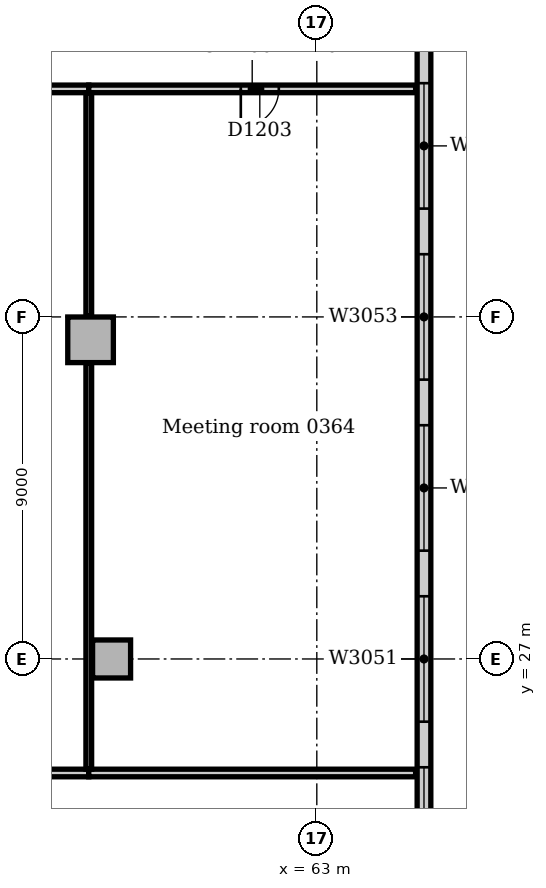
"""IFC4 building model, lengths in metres.
Left out: names, types, materials, properties, quantities, classifications, styles, units other than length and angle.
Written with IfcOpenShell. Run it as: python <this file> out.ifc"""

import sys

from ifc_helpers import new_model, si_unit, direction, frame, frame_2d, origin, origin_2d, place, context, subcontext, project, spatial, rectangle, extrude, element, fill, save


model = new_model("IFC4")
c1 = context("Model", 3, precision=1e-05, world=origin(), true_north=direction((0.0, 1.0)))
c2 = subcontext(c1, "Body", "Model", "MODEL_VIEW")
j1 = project(units=[si_unit("LENGTHUNIT", "METRE"), si_unit("PLANEANGLEUNIT", "RADIAN")], contexts=[c1])
p1 = place(None, origin())
s1 = spatial("IfcSite", under=j1, at=p1, CompositionType="ELEMENT")
p2 = place(p1, origin())
s2 = spatial("IfcBuilding", under=s1, at=p2, CompositionType="ELEMENT")
p3 = place(p2, frame((0.0, 0.0, 16.0)))
s3 = spatial("IfcBuildingStorey", under=s2, at=p3, CompositionType="ELEMENT", Elevation=16.0)
p4 = place(p3, frame((57.047, 35.398, 0.0), z_axis=(0.0, 0.0, 1.0), x_axis=(1.0, 0.0, 0.0)))
e1 = element("IfcColumn", 1, at=p4, inside=s3, PredefinedType="COLUMN", context=c2, shape_type="SweptSolid", body=[
    extrude(rectangle(XDim=1.2, YDim=1.2, at=origin_2d()), origin(), (0.0, 0.0, 1.0), 4.7),
])
p5 = place(p3, frame((57.6, 27.0, 0.0), z_axis=(0.0, 0.0, 1.0), x_axis=(1.0, 0.0, 0.0)))
e2 = element("IfcColumn", 2, at=p5, inside=s3, PredefinedType="COLUMN", context=c2, shape_type="SweptSolid", body=[
    extrude(rectangle(XDim=1.0, YDim=1.0, at=origin_2d()), origin(), (0.0, 0.0, 1.0), 4.7),
])
p6 = place(p3, frame((65.82, -9.0, 0.0), z_axis=(0.0, 0.0, 1.0), x_axis=(0.0, 1.0, 0.0)))
e3 = element("IfcWall", 3, at=p6, inside=s3, PredefinedType="STANDARD", context=c2, shape_type="SweptSolid", body=[
    extrude(rectangle(XDim=63.0, YDim=0.36, at=frame_2d((31.5, 0.0))), origin(), (0.0, 0.0, 1.0), 4.7),
])
p7 = place(p6, frame((2.85, 0.0, 0.9)))
e4 = element("IfcOpeningElement", 4, at=p7, cuts=e3, PredefinedType="OPENING", context=c2, shape_type="SweptSolid", body=[
    extrude(rectangle(XDim=3.3, YDim=2.4, at=frame_2d((1.65, 1.2))), frame((0.0, 0.19, 0.0), z_axis=(0.0, -1.0, 0.0), x_axis=(1.0, 0.0, 0.0)), (0.0, 0.0, 1.0), 0.38),
])
p8 = place(p6, frame((7.35, 0.0, 0.9)))
e5 = element("IfcOpeningElement", 5, at=p8, cuts=e3, PredefinedType="OPENING", context=c2, shape_type="SweptSolid", body=[
    extrude(rectangle(XDim=3.3, YDim=2.4, at=frame_2d((1.65, 1.2))), frame((0.0, 0.19, 0.0), z_axis=(0.0, -1.0, 0.0), x_axis=(1.0, 0.0, 0.0)), (0.0, 0.0, 1.0), 0.38),
])
p9 = place(p6, frame((11.85, 0.0, 0.9)))
e6 = element("IfcOpeningElement", 6, at=p9, cuts=e3, PredefinedType="OPENING", context=c2, shape_type="SweptSolid", body=[
    extrude(rectangle(XDim=3.3, YDim=2.4, at=frame_2d((1.65, 1.2))), frame((0.0, 0.19, 0.0), z_axis=(0.0, -1.0, 0.0), x_axis=(1.0, 0.0, 0.0)), (0.0, 0.0, 1.0), 0.38),
])
p10 = place(p6, frame((16.35, 0.0, 0.9)))
e7 = element("IfcOpeningElement", 7, at=p10, cuts=e3, PredefinedType="OPENING", context=c2, shape_type="SweptSolid", body=[
    extrude(rectangle(XDim=3.3, YDim=2.4, at=frame_2d((1.65, 1.2))), frame((0.0, 0.19, 0.0), z_axis=(0.0, -1.0, 0.0), x_axis=(1.0, 0.0, 0.0)), (0.0, 0.0, 1.0), 0.38),
])
p11 = place(p6, frame((20.85, 0.0, 0.9)))
e8 = element("IfcOpeningElement", 8, at=p11, cuts=e3, PredefinedType="OPENING", context=c2, shape_type="SweptSolid", body=[
    extrude(rectangle(XDim=3.3, YDim=2.4, at=frame_2d((1.65, 1.2))), frame((0.0, 0.19, 0.0), z_axis=(0.0, -1.0, 0.0), x_axis=(1.0, 0.0, 0.0)), (0.0, 0.0, 1.0), 0.38),
])
p12 = place(p6, frame((25.35, 0.0, 0.9)))
e9 = element("IfcOpeningElement", 9, at=p12, cuts=e3, PredefinedType="OPENING", context=c2, shape_type="SweptSolid", body=[
    extrude(rectangle(XDim=3.3, YDim=2.4, at=frame_2d((1.65, 1.2))), frame((0.0, 0.19, 0.0), z_axis=(0.0, -1.0, 0.0), x_axis=(1.0, 0.0, 0.0)), (0.0, 0.0, 1.0), 0.38),
])
p13 = place(p6, frame((29.85, 0.0, 0.9)))
e10 = element("IfcOpeningElement", 10, at=p13, cuts=e3, PredefinedType="OPENING", context=c2, shape_type="SweptSolid", body=[
    extrude(rectangle(XDim=3.3, YDim=2.4, at=frame_2d((1.65, 1.2))), frame((0.0, 0.19, 0.0), z_axis=(0.0, -1.0, 0.0), x_axis=(1.0, 0.0, 0.0)), (0.0, 0.0, 1.0), 0.38),
])
p14 = place(p6, frame((34.35, 0.0, 0.9)))
e11 = element("IfcOpeningElement", 11, at=p14, cuts=e3, PredefinedType="OPENING", context=c2, shape_type="SweptSolid", body=[
    extrude(rectangle(XDim=3.3, YDim=2.4, at=frame_2d((1.65, 1.2))), frame((0.0, 0.19, 0.0), z_axis=(0.0, -1.0, 0.0), x_axis=(1.0, 0.0, 0.0)), (0.0, 0.0, 1.0), 0.38),
])
p15 = place(p6, frame((38.85, 0.0, 0.9)))
e12 = element("IfcOpeningElement", 12, at=p15, cuts=e3, PredefinedType="OPENING", context=c2, shape_type="SweptSolid", body=[
    extrude(rectangle(XDim=3.3, YDim=2.4, at=frame_2d((1.65, 1.2))), frame((0.0, 0.19, 0.0), z_axis=(0.0, -1.0, 0.0), x_axis=(1.0, 0.0, 0.0)), (0.0, 0.0, 1.0), 0.38),
])
p16 = place(p6, frame((43.35, 0.0, 0.9)))
e13 = element("IfcOpeningElement", 13, at=p16, cuts=e3, PredefinedType="OPENING", context=c2, shape_type="SweptSolid", body=[
    extrude(rectangle(XDim=3.3, YDim=2.4, at=frame_2d((1.65, 1.2))), frame((0.0, 0.19, 0.0), z_axis=(0.0, -1.0, 0.0), x_axis=(1.0, 0.0, 0.0)), (0.0, 0.0, 1.0), 0.38),
])
p17 = place(p6, frame((47.85, 0.0, 0.9)))
e14 = element("IfcOpeningElement", 14, at=p17, cuts=e3, PredefinedType="OPENING", context=c2, shape_type="SweptSolid", body=[
    extrude(rectangle(XDim=3.3, YDim=2.4, at=frame_2d((1.65, 1.2))), frame((0.0, 0.19, 0.0), z_axis=(0.0, -1.0, 0.0), x_axis=(1.0, 0.0, 0.0)), (0.0, 0.0, 1.0), 0.38),
])
p18 = place(p6, frame((52.35, 0.0, 0.9)))
e15 = element("IfcOpeningElement", 15, at=p18, cuts=e3, PredefinedType="OPENING", context=c2, shape_type="SweptSolid", body=[
    extrude(rectangle(XDim=3.3, YDim=2.4, at=frame_2d((1.65, 1.2))), frame((0.0, 0.19, 0.0), z_axis=(0.0, -1.0, 0.0), x_axis=(1.0, 0.0, 0.0)), (0.0, 0.0, 1.0), 0.38),
])
p19 = place(p6, frame((56.85, 0.0, 0.9)))
e16 = element("IfcOpeningElement", 16, at=p19, cuts=e3, PredefinedType="OPENING", context=c2, shape_type="SweptSolid", body=[
    extrude(rectangle(XDim=3.3, YDim=2.4, at=frame_2d((1.65, 1.2))), frame((0.0, 0.19, 0.0), z_axis=(0.0, -1.0, 0.0), x_axis=(1.0, 0.0, 0.0)), (0.0, 0.0, 1.0), 0.38),
])
p20 = place(p3, frame((48.0, 42.0, 0.0), z_axis=(0.0, 0.0, 1.0), x_axis=(1.0, 0.0, 0.0)))
e17 = element("IfcWall", 17, at=p20, inside=s3, PredefinedType="PARTITIONING", context=c2, shape_type="SweptSolid", body=[
    extrude(rectangle(XDim=9.0, YDim=0.2, at=frame_2d((4.5, 0.0))), origin(), (0.0, 0.0, 1.0), 4.7),
])
p21 = place(p20, frame((4.0, 0.0, 0.0)))
e18 = element("IfcOpeningElement", 18, at=p21, cuts=e17, PredefinedType="OPENING", context=c2, shape_type="SweptSolid", body=[
    extrude(rectangle(XDim=1.0, YDim=2.1, at=frame_2d((0.5, 1.05))), frame((0.0, 0.11, 0.0), z_axis=(0.0, -1.0, 0.0), x_axis=(1.0, 0.0, 0.0)), (0.0, 0.0, 1.0), 0.22),
])
p22 = place(p3, frame((57.0, 42.0, 0.0), z_axis=(0.0, 0.0, 1.0), x_axis=(1.0, 0.0, 0.0)))
e19 = element("IfcWall", 19, at=p22, inside=s3, PredefinedType="PARTITIONING", context=c2, shape_type="SweptSolid", body=[
    extrude(rectangle(XDim=8.6, YDim=0.2, at=frame_2d((4.3, 0.0))), origin(), (0.0, 0.0, 1.0), 4.7),
])
p23 = place(p22, frame((4.0, 0.0, 0.0)))
e20 = element("IfcOpeningElement", 20, at=p23, cuts=e19, PredefinedType="OPENING", context=c2, shape_type="SweptSolid", body=[
    extrude(rectangle(XDim=1.0, YDim=2.1, at=frame_2d((0.5, 1.05))), frame((0.0, 0.11, 0.0), z_axis=(0.0, -1.0, 0.0), x_axis=(1.0, 0.0, 0.0)), (0.0, 0.0, 1.0), 0.22),
])
p24 = place(p3, frame((48.0, 24.0, 0.0), z_axis=(0.0, 0.0, 1.0), x_axis=(1.0, 0.0, 0.0)))
e21 = element("IfcWall", 21, at=p24, inside=s3, PredefinedType="PARTITIONING", context=c2, shape_type="SweptSolid", body=[
    extrude(rectangle(XDim=9.0, YDim=0.2, at=frame_2d((4.5, 0.0))), origin(), (0.0, 0.0, 1.0), 4.7),
])
p25 = place(p3, frame((57.0, 24.0, 0.0), z_axis=(0.0, 0.0, 1.0), x_axis=(1.0, 0.0, 0.0)))
e22 = element("IfcWall", 22, at=p25, inside=s3, PredefinedType="PARTITIONING", context=c2, shape_type="SweptSolid", body=[
    extrude(rectangle(XDim=8.6, YDim=0.2, at=frame_2d((4.3, 0.0))), origin(), (0.0, 0.0, 1.0), 4.7),
])
p26 = place(p3, frame((57.0, 24.1, 0.0), z_axis=(0.0, 0.0, 1.0), x_axis=(0.0, 1.0, 0.0)))
e23 = element("IfcWall", 23, at=p26, inside=s3, PredefinedType="PARTITIONING", context=c2, shape_type="SweptSolid", body=[
    extrude(rectangle(XDim=10.678, YDim=0.15, at=frame_2d((5.339, 0.0))), origin(), (0.0, 0.0, 1.0), 4.7),
])
p27 = place(p3, frame((57.0, 36.018, 0.0), z_axis=(0.0, 0.0, 1.0), x_axis=(0.0, 1.0, 0.0)))
e24 = element("IfcWall", 24, at=p27, inside=s3, PredefinedType="PARTITIONING", context=c2, shape_type="SweptSolid", body=[
    extrude(rectangle(XDim=5.882, YDim=0.15, at=frame_2d((2.941, 0.0))), origin(), (0.0, 0.0, 1.0), 4.7),
])
p28 = place(p13, origin())
e25 = element("IfcWindow", 25, at=p28, inside=s3, PartitioningType="SINGLE_PANEL", PredefinedType="WINDOW", context=c2, shape_type="SweptSolid", body=[
    extrude(rectangle(XDim=3.3, YDim=2.4, at=frame_2d((1.65, 1.2))), frame((0.0, 0.13, 0.0), z_axis=(0.0, -1.0, 0.0), x_axis=(1.0, 0.0, 0.0)), (0.0, 0.0, 1.0), 0.06),
])
fill(e10, e25)
p29 = place(p14, origin())
e26 = element("IfcWindow", 26, at=p29, inside=s3, PartitioningType="SINGLE_PANEL", PredefinedType="WINDOW", context=c2, shape_type="SweptSolid", body=[
    extrude(rectangle(XDim=3.3, YDim=2.4, at=frame_2d((1.65, 1.2))), frame((0.0, 0.13, 0.0), z_axis=(0.0, -1.0, 0.0), x_axis=(1.0, 0.0, 0.0)), (0.0, 0.0, 1.0), 0.06),
])
fill(e11, e26)
p30 = place(p15, origin())
e27 = element("IfcWindow", 27, at=p30, inside=s3, PartitioningType="SINGLE_PANEL", PredefinedType="WINDOW", context=c2, shape_type="SweptSolid", body=[
    extrude(rectangle(XDim=3.3, YDim=2.4, at=frame_2d((1.65, 1.2))), frame((0.0, 0.13, 0.0), z_axis=(0.0, -1.0, 0.0), x_axis=(1.0, 0.0, 0.0)), (0.0, 0.0, 1.0), 0.06),
])
fill(e12, e27)
p31 = place(p16, origin())
e28 = element("IfcWindow", 28, at=p31, inside=s3, PartitioningType="SINGLE_PANEL", PredefinedType="WINDOW", context=c2, shape_type="SweptSolid", body=[
    extrude(rectangle(XDim=3.3, YDim=2.4, at=frame_2d((1.65, 1.2))), frame((0.0, 0.13, 0.0), z_axis=(0.0, -1.0, 0.0), x_axis=(1.0, 0.0, 0.0)), (0.0, 0.0, 1.0), 0.06),
])
fill(e13, e28)
p32 = place(p17, origin())
e29 = element("IfcWindow", 29, at=p32, inside=s3, PartitioningType="SINGLE_PANEL", PredefinedType="WINDOW", context=c2, shape_type="SweptSolid", body=[
    extrude(rectangle(XDim=3.3, YDim=2.4, at=frame_2d((1.65, 1.2))), frame((0.0, 0.13, 0.0), z_axis=(0.0, -1.0, 0.0), x_axis=(1.0, 0.0, 0.0)), (0.0, 0.0, 1.0), 0.06),
])
fill(e14, e29)
p33 = place(p23, frame((1.0, 0.0, 0.0), z_axis=(0.0, 0.0, 1.0), x_axis=(-1.0, 0.0, 0.0)))
e30 = element("IfcDoor", 30, at=p33, inside=s3, OperationType="SINGLE_SWING_RIGHT", PredefinedType="DOOR", context=c2, shape_type="SweptSolid", body=[
    extrude(rectangle(XDim=1.0, YDim=2.1, at=frame_2d((0.5, 1.05))), frame((0.0, 0.025, 0.0), z_axis=(0.0, -1.0, 0.0), x_axis=(1.0, 0.0, 0.0)), (0.0, 0.0, 1.0), 0.05),
])
fill(e20, e30)
save(model, sys.argv[1])
